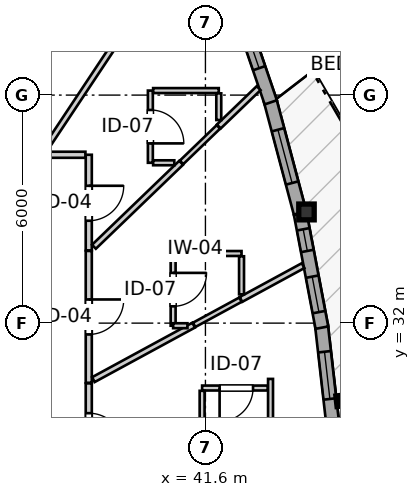
"""IFC4 building model, lengths in metres.
Left out: names, types, materials, properties, quantities, classifications, styles, units other than length and angle.
Written with IfcOpenShell. Run it as: python <this file> out.ifc"""

import sys

from ifc_helpers import new_model, si_unit, direction, frame, frame_2d, origin, origin_2d, place, context, subcontext, project, spatial, rectangle, i_section, extrude, source, transform, mapped, element, fill, save


model = new_model("IFC4")
c1 = context("Model", 3, precision=1e-05, world=origin(), true_north=direction((0.0, 1.0)))
c2 = subcontext(c1, "Body", "Model", "MODEL_VIEW")
j1 = project(units=[si_unit("LENGTHUNIT", "METRE"), si_unit("PLANEANGLEUNIT", "RADIAN")], contexts=[c1])
p1 = place(None, origin())
s1 = spatial("IfcSite", under=j1, at=p1, CompositionType="ELEMENT")
p2 = place(p1, origin())
s2 = spatial("IfcBuilding", under=s1, at=p2, CompositionType="ELEMENT")
p3 = place(p2, frame((0.0, 0.0, 112.0)))
s3 = spatial("IfcBuildingStorey", under=s2, at=p3, CompositionType="ELEMENT", Elevation=112.0)
m1 = source(origin(), c2, "Body", "SweptSolid", [
    extrude(i_section(OverallWidth=0.406, OverallDepth=0.416, WebThickness=0.027, FlangeThickness=0.044, FilletRadius=0.015, at=origin_2d()), origin(), (0.0, 0.0, 1.0), 2.935),
])
p4 = place(p3, frame((44.259, 34.925, 0.0), z_axis=(0.0, 0.0, 1.0), x_axis=(1.0, 0.0, 0.0)))
e1 = element("IfcColumn", 1, at=p4, inside=s3, PredefinedType="PILASTER", context=c2, shape_type="MappedRepresentation", body=[
    mapped(m1, transform((0.0, 0.0, 0.0), x_axis=(1.0, 0.0, 0.0), y_axis=(0.0, 1.0, 0.0), z_axis=(0.0, 0.0, 1.0), scale=1.0)),
])
p5 = place(p3, frame((44.968, 29.184, 0.0), z_axis=(0.0, 0.0, 1.0), x_axis=(-0.113251751131, 0.993566324342, 0.0)))
e2 = element("IfcWall", 2, at=p5, inside=s3, PredefinedType="SOLIDWALL", context=c2, shape_type="SweptSolid", body=[
    extrude(rectangle(XDim=2.802, YDim=0.34, at=frame_2d((1.401, 0.0))), origin(), (0.0, 0.0, 1.0), 2.465),
])
p6 = place(p5, frame((0.826, 0.0, 0.82)))
e3 = element("IfcOpeningElement", 3, at=p6, cuts=e2, PredefinedType="OPENING", context=c2, shape_type="SweptSolid", body=[
    extrude(rectangle(XDim=1.25, YDim=1.35, at=frame_2d((0.625, 0.675))), frame((0.0, 0.18, 0.0), z_axis=(0.0, -1.0, 0.0), x_axis=(1.0, 0.0, 0.0)), (0.0, 0.0, 1.0), 0.36),
])
p7 = place(p3, frame((44.664, 31.881, 0.0), z_axis=(0.0, 0.0, 1.0), x_axis=(-0.18665909876, 0.982424745642, 0.0)))
e4 = element("IfcWall", 4, at=p7, inside=s3, PredefinedType="SOLIDWALL", context=c2, shape_type="SweptSolid", body=[
    extrude(rectangle(XDim=3.046, YDim=0.34, at=frame_2d((1.523, 0.0))), origin(), (0.0, 0.0, 1.0), 2.465),
])
p8 = place(p7, frame((0.416, 0.0, 0.82)))
e5 = element("IfcOpeningElement", 5, at=p8, cuts=e4, PredefinedType="OPENING", context=c2, shape_type="SweptSolid", body=[
    extrude(rectangle(XDim=0.95, YDim=1.35, at=frame_2d((0.475, 0.675))), frame((0.0, 0.18, 0.0), z_axis=(0.0, -1.0, 0.0), x_axis=(1.0, 0.0, 0.0)), (0.0, 0.0, 1.0), 0.36),
])
p9 = place(p7, frame((2.054, 0.0, 0.82)))
e6 = element("IfcOpeningElement", 6, at=p9, cuts=e4, PredefinedType="OPENING", context=c2, shape_type="SweptSolid", body=[
    extrude(rectangle(XDim=0.58, YDim=1.35, at=frame_2d((0.29, 0.675))), frame((0.0, 0.18, 0.0), z_axis=(0.0, -1.0, 0.0), x_axis=(1.0, 0.0, 0.0)), (0.0, 0.0, 1.0), 0.36),
])
p10 = place(p3, frame((44.09, 34.901, 0.0), z_axis=(0.0, 0.0, 1.0), x_axis=(-0.257108087637, 0.966382652613, 0.0)))
e7 = element("IfcWall", 7, at=p10, inside=s3, PredefinedType="SOLIDWALL", context=c2, shape_type="SweptSolid", body=[
    extrude(rectangle(XDim=3.096, YDim=0.34, at=frame_2d((1.548, 0.0))), origin(), (0.0, 0.0, 1.0), 2.465),
])
p11 = place(p10, frame((0.813, 0.0, 0.82)))
e8 = element("IfcOpeningElement", 8, at=p11, cuts=e7, PredefinedType="OPENING", context=c2, shape_type="SweptSolid", body=[
    extrude(rectangle(XDim=1.45, YDim=1.25, at=frame_2d((0.725, 0.625))), frame((0.0, 0.18, 0.0), z_axis=(0.0, -1.0, 0.0), x_axis=(1.0, 0.0, 0.0)), (0.0, 0.0, 1.0), 0.36),
])
p12 = place(p3, frame((43.319, 37.809, 0.0), z_axis=(0.0, 0.0, 1.0), x_axis=(-0.323586371726, 0.946198636669, 0.0)))
e9 = element("IfcWall", 9, at=p12, inside=s3, PredefinedType="SOLIDWALL", context=c2, shape_type="SweptSolid", body=[
    extrude(rectangle(XDim=2.952, YDim=0.34, at=frame_2d((1.476, 0.0))), origin(), (0.0, 0.0, 1.0), 2.465),
])
p13 = place(p12, frame((0.949, 0.0, 0.82)))
e10 = element("IfcOpeningElement", 10, at=p13, cuts=e9, PredefinedType="OPENING", context=c2, shape_type="SweptSolid", body=[
    extrude(rectangle(XDim=1.45, YDim=1.25, at=frame_2d((0.725, 0.625))), frame((0.0, 0.18, 0.0), z_axis=(0.0, -1.0, 0.0), x_axis=(1.0, 0.0, 0.0)), (0.0, 0.0, 1.0), 0.36),
])
p14 = place(p3, frame((38.53, 33.899, 0.0), z_axis=(0.0, 0.0, 1.0), x_axis=(0.0, -1.0, 0.0)))
e11 = element("IfcWall", 11, at=p14, inside=s3, PredefinedType="PARTITIONING", context=c2, shape_type="SweptSolid", body=[
    extrude(rectangle(XDim=3.469, YDim=0.16, at=frame_2d((1.734, 0.0))), origin(), (0.0, 0.0, 1.0), 2.935),
])
p15 = place(p14, frame((1.277, 0.0, 0.0)))
e12 = element("IfcOpeningElement", 12, at=p15, cuts=e11, PredefinedType="OPENING", context=c2, shape_type="SweptSolid", body=[
    extrude(rectangle(XDim=0.92, YDim=2.1, at=frame_2d((0.46, 1.05))), frame((0.0, 0.09, 0.0), z_axis=(0.0, -1.0, 0.0), x_axis=(1.0, 0.0, 0.0)), (0.0, 0.0, 1.0), 0.18),
])
p16 = place(p3, frame((38.53, 30.415, 0.0), z_axis=(0.0, 0.0, 1.0), x_axis=(0.0, -1.0, 0.0)))
e13 = element("IfcWall", 13, at=p16, inside=s3, PredefinedType="PARTITIONING", context=c2, shape_type="SweptSolid", body=[
    extrude(rectangle(XDim=2.536, YDim=0.16, at=frame_2d((1.268, 0.0))), origin(), (0.0, 0.0, 1.0), 2.935),
])
p17 = place(p16, frame((0.784, 0.0, 0.0)))
e14 = element("IfcOpeningElement", 14, at=p17, cuts=e13, PredefinedType="OPENING", context=c2, shape_type="SweptSolid", body=[
    extrude(rectangle(XDim=0.92, YDim=2.1, at=frame_2d((0.46, 1.05))), frame((0.0, 0.09, 0.0), z_axis=(0.0, -1.0, 0.0), x_axis=(1.0, 0.0, 0.0)), (0.0, 0.0, 1.0), 0.18),
])
p18 = place(p3, frame((38.53, 36.43, 0.0), z_axis=(0.0, 0.0, 1.0), x_axis=(0.0, -1.0, 0.0)))
e15 = element("IfcWall", 15, at=p18, inside=s3, PredefinedType="PARTITIONING", context=c2, shape_type="SweptSolid", body=[
    extrude(rectangle(XDim=2.516, YDim=0.16, at=frame_2d((1.258, 0.0))), origin(), (0.0, 0.0, 1.0), 2.573),
])
p19 = place(p18, frame((0.816, 0.0, 0.0)))
e16 = element("IfcOpeningElement", 16, at=p19, cuts=e15, PredefinedType="OPENING", context=c2, shape_type="SweptSolid", body=[
    extrude(rectangle(XDim=0.92, YDim=2.1, at=frame_2d((0.46, 1.05))), frame((0.0, 0.09, 0.0), z_axis=(0.0, -1.0, 0.0), x_axis=(1.0, 0.0, 0.0)), (0.0, 0.0, 1.0), 0.18),
])
p20 = place(p3, frame((40.75, 33.832, 0.0), z_axis=(0.0, 0.0, 1.0), x_axis=(0.0, -1.0, 0.0)))
e17 = element("IfcWall", 17, at=p20, inside=s3, PredefinedType="PARTITIONING", context=c2, shape_type="SweptSolid", body=[
    extrude(rectangle(XDim=1.9, YDim=0.13, at=frame_2d((0.95, 0.0))), origin(), (0.0, 0.0, 1.0), 2.935),
])
p21 = place(p20, frame((0.51, 0.0, 0.0)))
e18 = element("IfcOpeningElement", 18, at=p21, cuts=e17, PredefinedType="OPENING", context=c2, shape_type="SweptSolid", body=[
    extrude(rectangle(XDim=0.88, YDim=2.05, at=frame_2d((0.44, 1.025))), frame((0.0, 0.075, 0.0), z_axis=(0.0, -1.0, 0.0), x_axis=(1.0, 0.0, 0.0)), (0.0, 0.0, 1.0), 0.15),
])
p22 = place(p3, frame((40.151, 38.119, 0.0), z_axis=(0.0, 0.0, 1.0), x_axis=(0.0, -1.0, 0.0)))
e19 = element("IfcWall", 19, at=p22, inside=s3, PredefinedType="PARTITIONING", context=c2, shape_type="SweptSolid", body=[
    extrude(rectangle(XDim=1.9, YDim=0.13, at=frame_2d((0.95, 0.0))), origin(), (0.0, 0.0, 1.0), 2.935),
])
p23 = place(p22, frame((0.51, 0.0, 0.0)))
e20 = element("IfcOpeningElement", 20, at=p23, cuts=e19, PredefinedType="OPENING", context=c2, shape_type="SweptSolid", body=[
    extrude(rectangle(XDim=0.88, YDim=2.05, at=frame_2d((0.44, 1.025))), frame((0.0, 0.075, 0.0), z_axis=(0.0, -1.0, 0.0), x_axis=(1.0, 0.0, 0.0)), (0.0, 0.0, 1.0), 0.15),
])
p24 = place(p3, frame((43.24, 30.292, 0.0), z_axis=(0.0, 0.0, 1.0), x_axis=(-1.0, 0.0, 0.0)))
e21 = element("IfcWall", 21, at=p24, inside=s3, PredefinedType="PARTITIONING", context=c2, shape_type="SweptSolid", body=[
    extrude(rectangle(XDim=1.727, YDim=0.13, at=frame_2d((0.864, 0.0))), origin(), (0.0, 0.0, 1.0), 2.935),
])
p25 = place(p24, frame((0.387, 0.0, 0.0)))
e22 = element("IfcOpeningElement", 22, at=p25, cuts=e21, PredefinedType="OPENING", context=c2, shape_type="SweptSolid", body=[
    extrude(rectangle(XDim=0.88, YDim=2.05, at=frame_2d((0.44, 1.025))), frame((0.0, 0.075, 0.0), z_axis=(0.0, -1.0, 0.0), x_axis=(1.0, 0.0, 0.0)), (0.0, 0.0, 1.0), 0.15),
])
p26 = place(p3, frame((35.191, 36.548, 0.0), z_axis=(0.0, 0.0, 1.0), x_axis=(0.417154036681, 0.908835799075, 0.0)))
e23 = element("IfcWall", 23, at=p26, inside=s3, PredefinedType="PARTITIONING", context=c2, shape_type="SweptSolid", body=[
    extrude(rectangle(XDim=9.949, YDim=0.145, at=frame_2d((4.974, 0.0))), origin(), (0.0, 0.0, 1.0), 2.935),
])
p27 = place(p3, frame((37.366, 36.557, 0.0), z_axis=(0.0, 0.0, 1.0), x_axis=(0.553463679146, 0.832873313215, 0.0)))
e24 = element("IfcWall", 24, at=p27, inside=s3, PredefinedType="PARTITIONING", context=c2, shape_type="SweptSolid", body=[
    extrude(rectangle(XDim=7.704, YDim=0.145, at=frame_2d((3.852, 0.0))), origin(), (0.0, 0.0, 1.0), 2.935),
])
p28 = place(p3, frame((38.666, 34.009, 0.0), z_axis=(0.0, 0.0, 1.0), x_axis=(0.72031454127, 0.693647577402, 0.0)))
e25 = element("IfcWall", 25, at=p28, inside=s3, PredefinedType="PARTITIONING", context=c2, shape_type="SweptSolid", body=[
    extrude(rectangle(XDim=3.186, YDim=0.145, at=frame_2d((1.593, 0.0))), origin(), (0.0, 0.0, 1.0), 2.935),
])
p29 = place(p3, frame((38.652, 30.513, 0.0), z_axis=(0.0, 0.0, 1.0), x_axis=(0.878637115469, 0.47749012484, 0.0)))
e26 = element("IfcWall", 26, at=p29, inside=s3, PredefinedType="PARTITIONING", context=c2, shape_type="SweptSolid", body=[
    extrude(rectangle(XDim=3.003, YDim=0.145, at=frame_2d((1.501, 0.0))), origin(), (0.0, 0.0, 1.0), 2.935),
])
p30 = place(p3, frame((42.535, 32.624, 0.0), z_axis=(0.0, 0.0, 1.0), x_axis=(0.878631690287, 0.477500107669, 0.0)))
e27 = element("IfcWall", 27, at=p30, inside=s3, PredefinedType="PARTITIONING", context=c2, shape_type="SweptSolid", body=[
    extrude(rectangle(XDim=1.861, YDim=0.145, at=frame_2d((0.93, 0.0))), origin(), (0.0, 0.0, 1.0), 2.935),
])
p31 = place(p3, frame((40.224, 38.119, 0.0), z_axis=(0.0, 0.0, 1.0), x_axis=(1.0, 0.0, 0.0)))
e28 = element("IfcWall", 28, at=p31, inside=s3, PredefinedType="PARTITIONING", context=c2, shape_type="SweptSolid", body=[
    extrude(rectangle(XDim=1.727, YDim=0.13, at=frame_2d((0.863, 0.0))), origin(), (0.0, 0.0, 1.0), 2.935),
])
p32 = place(p3, frame((40.823, 33.832, 0.0), z_axis=(0.0, 0.0, 1.0), x_axis=(1.0, 0.0, 0.0)))
e29 = element("IfcWall", 29, at=p32, inside=s3, PredefinedType="PARTITIONING", context=c2, shape_type="SweptSolid", body=[
    extrude(rectangle(XDim=1.727, YDim=0.13, at=frame_2d((0.864, 0.0))), origin(), (0.0, 0.0, 1.0), 2.935),
])
p33 = place(p3, frame((41.513, 28.683, 0.0), z_axis=(0.0, 0.0, 1.0), x_axis=(0.0, 1.0, 0.0)))
e30 = element("IfcWall", 30, at=p33, inside=s3, PredefinedType="PARTITIONING", context=c2, shape_type="SweptSolid", body=[
    extrude(rectangle(XDim=1.536, YDim=0.13, at=frame_2d((0.768, 0.0))), origin(), (0.0, 0.0, 1.0), 2.935),
])
p34 = place(p3, frame((41.951, 37.173, 0.0), z_axis=(0.0, 0.0, 1.0), x_axis=(0.720559112487, 0.693393514111, 0.0)))
e31 = element("IfcWall", 31, at=p34, inside=s3, PredefinedType="PARTITIONING", context=c2, shape_type="SweptSolid", body=[
    extrude(rectangle(XDim=1.456, YDim=0.145, at=frame_2d((0.728, 0.0))), origin(), (0.0, 0.0, 1.0), 2.935),
])
p35 = place(p3, frame((41.303, 31.954, 0.0), z_axis=(0.0, 0.0, 1.0), x_axis=(0.87855387187, 0.477643270885, 0.0)))
e32 = element("IfcWall", 32, at=p35, inside=s3, PredefinedType="PARTITIONING", context=c2, shape_type="SweptSolid", body=[
    extrude(rectangle(XDim=1.387, YDim=0.13, at=frame_2d((0.694, 0.0))), origin(), (0.0, 0.0, 1.0), 2.935),
])
p36 = place(p3, frame((40.972, 36.229, 0.0), z_axis=(0.0, 0.0, 1.0), x_axis=(0.72014550452, 0.693823069896, 0.0)))
e33 = element("IfcWall", 33, at=p36, inside=s3, PredefinedType="PARTITIONING", context=c2, shape_type="SweptSolid", body=[
    extrude(rectangle(XDim=1.345, YDim=0.13, at=frame_2d((0.672, 0.0))), origin(), (0.0, 0.0, 1.0), 2.935),
])
p37 = place(p3, frame((43.313, 28.762, 0.0), z_axis=(0.0, 0.0, 1.0), x_axis=(0.0, 1.0, 0.0)))
e34 = element("IfcWall", 34, at=p37, inside=s3, PredefinedType="PARTITIONING", context=c2, shape_type="SweptSolid", body=[
    extrude(rectangle(XDim=1.77, YDim=0.13, at=frame_2d((0.885, 0.0))), origin(), (0.0, 0.0, 1.0), 2.935),
])
p38 = place(p3, frame((37.463, 36.43, 0.0), z_axis=(0.0, 0.0, 1.0), x_axis=(1.0, 0.0, 0.0)))
e35 = element("IfcWall", 35, at=p38, inside=s3, PredefinedType="PARTITIONING", context=c2, shape_type="SweptSolid", body=[
    extrude(rectangle(XDim=0.979, YDim=0.16, at=frame_2d((0.489, 0.0))), origin(), (0.0, 0.0, 1.0), 2.573),
])
p39 = place(p3, frame((42.55, 32.758, 0.0), z_axis=(0.0, 0.0, 1.0), x_axis=(0.0, 1.0, 0.0)))
e36 = element("IfcWall", 36, at=p39, inside=s3, PredefinedType="PARTITIONING", context=c2, shape_type="SweptSolid", body=[
    extrude(rectangle(XDim=1.001, YDim=0.13, at=frame_2d((0.5, 0.0))), origin(), (0.0, 0.0, 1.0), 2.935),
])
p40 = place(p3, frame((41.951, 37.344, 0.0), z_axis=(0.0, 0.0, 1.0), x_axis=(0.0, 1.0, 0.0)))
e37 = element("IfcWall", 37, at=p40, inside=s3, PredefinedType="PARTITIONING", context=c2, shape_type="SweptSolid", body=[
    extrude(rectangle(XDim=0.702, YDim=0.13, at=frame_2d((0.351, 0.0))), origin(), (0.0, 0.0, 1.0), 2.935),
])
p41 = place(p3, frame((40.224, 36.219, 0.0), z_axis=(0.0, 0.0, 1.0), x_axis=(1.0, 0.0, 0.0)))
e38 = element("IfcWall", 38, at=p41, inside=s3, PredefinedType="PARTITIONING", context=c2, shape_type="SweptSolid", body=[
    extrude(rectangle(XDim=0.557, YDim=0.13, at=frame_2d((0.278, 0.0))), origin(), (0.0, 0.0, 1.0), 2.935),
])
p42 = place(p3, frame((40.75, 31.932, 0.0), z_axis=(0.0, 0.0, 1.0), x_axis=(1.0, 0.0, 0.0)))
e39 = element("IfcWall", 39, at=p42, inside=s3, PredefinedType="PARTITIONING", context=c2, shape_type="SweptSolid", body=[
    extrude(rectangle(XDim=0.377, YDim=0.13, at=frame_2d((0.188, 0.0))), origin(), (0.0, 0.0, 1.0), 2.935),
])
m2 = source(origin(), c2, "Body", "SweptSolid", [
    extrude(rectangle(XDim=1.25, YDim=1.35, at=frame_2d((0.625, 0.675))), frame((0.0, 0.03, 0.0), z_axis=(0.0, -1.0, 0.0), x_axis=(1.0, 0.0, 0.0)), (0.0, 0.0, 1.0), 0.06),
])
p43 = place(p6, origin())
e40 = element("IfcWindow", 40, at=p43, inside=s3, PartitioningType="SINGLE_PANEL", PredefinedType="WINDOW", context=c2, shape_type="MappedRepresentation", body=[
    mapped(m2, transform((0.0, 0.0, 0.0), x_axis=(1.0, 0.0, 0.0), y_axis=(0.0, 1.0, 0.0), z_axis=(0.0, 0.0, 1.0), scale=1.0)),
])
fill(e3, e40)
m3 = source(origin(), c2, "Body", "SweptSolid", [
    extrude(rectangle(XDim=0.95, YDim=1.35, at=frame_2d((0.475, 0.675))), frame((0.0, 0.03, 0.0), z_axis=(0.0, -1.0, 0.0), x_axis=(1.0, 0.0, 0.0)), (0.0, 0.0, 1.0), 0.06),
])
p44 = place(p8, origin())
e41 = element("IfcWindow", 41, at=p44, inside=s3, PartitioningType="SINGLE_PANEL", PredefinedType="WINDOW", context=c2, shape_type="MappedRepresentation", body=[
    mapped(m3, transform((0.0, 0.0, 0.0), x_axis=(1.0, 0.0, 0.0), y_axis=(0.0, 1.0, 0.0), z_axis=(0.0, 0.0, 1.0), scale=1.0)),
])
fill(e5, e41)
m4 = source(origin(), c2, "Body", "SweptSolid", [
    extrude(rectangle(XDim=0.58, YDim=1.35, at=frame_2d((0.29, 0.675))), frame((0.0, 0.03, 0.0), z_axis=(0.0, -1.0, 0.0), x_axis=(1.0, 0.0, 0.0)), (0.0, 0.0, 1.0), 0.06),
])
p45 = place(p9, origin())
e42 = element("IfcWindow", 42, at=p45, inside=s3, PartitioningType="SINGLE_PANEL", PredefinedType="WINDOW", context=c2, shape_type="MappedRepresentation", body=[
    mapped(m4, transform((0.0, 0.0, 0.0), x_axis=(1.0, 0.0, 0.0), y_axis=(0.0, 1.0, 0.0), z_axis=(0.0, 0.0, 1.0), scale=1.0)),
])
fill(e6, e42)
m5 = source(origin(), c2, "Body", "SweptSolid", [
    extrude(rectangle(XDim=1.45, YDim=1.25, at=frame_2d((0.725, 0.625))), frame((0.0, 0.03, 0.0), z_axis=(0.0, -1.0, 0.0), x_axis=(1.0, 0.0, 0.0)), (0.0, 0.0, 1.0), 0.06),
])
p46 = place(p11, origin())
e43 = element("IfcWindow", 43, at=p46, inside=s3, PartitioningType="SINGLE_PANEL", PredefinedType="WINDOW", context=c2, shape_type="MappedRepresentation", body=[
    mapped(m5, transform((0.0, 0.0, 0.0), x_axis=(1.0, 0.0, 0.0), y_axis=(0.0, 1.0, 0.0), z_axis=(0.0, 0.0, 1.0), scale=1.0)),
])
fill(e8, e43)
p47 = place(p13, origin())
e44 = element("IfcWindow", 44, at=p47, inside=s3, PartitioningType="SINGLE_PANEL", PredefinedType="WINDOW", context=c2, shape_type="MappedRepresentation", body=[
    mapped(m5, transform((0.0, 0.0, 0.0), x_axis=(1.0, 0.0, 0.0), y_axis=(0.0, 1.0, 0.0), z_axis=(0.0, 0.0, 1.0), scale=1.0)),
])
fill(e10, e44)
m6 = source(origin(), c2, "Body", "SweptSolid", [
    extrude(rectangle(XDim=0.92, YDim=2.1, at=frame_2d((0.46, 1.05))), frame((0.0, 0.025, 0.0), z_axis=(0.0, -1.0, 0.0), x_axis=(1.0, 0.0, 0.0)), (0.0, 0.0, 1.0), 0.05),
])
p48 = place(p15, origin())
e45 = element("IfcDoor", 45, at=p48, inside=s3, OperationType="SINGLE_SWING_LEFT", PredefinedType="DOOR", context=c2, shape_type="MappedRepresentation", body=[
    mapped(m6, transform((0.0, 0.0, 0.0), x_axis=(1.0, 0.0, 0.0), y_axis=(0.0, 1.0, 0.0), z_axis=(0.0, 0.0, 1.0), scale=1.0)),
])
fill(e12, e45)
p49 = place(p17, origin())
e46 = element("IfcDoor", 46, at=p49, inside=s3, OperationType="SINGLE_SWING_RIGHT", PredefinedType="DOOR", context=c2, shape_type="MappedRepresentation", body=[
    mapped(m6, transform((0.0, 0.0, 0.0), x_axis=(1.0, 0.0, 0.0), y_axis=(0.0, 1.0, 0.0), z_axis=(0.0, 0.0, 1.0), scale=1.0)),
])
fill(e14, e46)
p50 = place(p19, origin())
e47 = element("IfcDoor", 47, at=p50, inside=s3, OperationType="SINGLE_SWING_LEFT", PredefinedType="DOOR", context=c2, shape_type="MappedRepresentation", body=[
    mapped(m6, transform((0.0, 0.0, 0.0), x_axis=(1.0, 0.0, 0.0), y_axis=(0.0, 1.0, 0.0), z_axis=(0.0, 0.0, 1.0), scale=1.0)),
])
fill(e16, e47)
m7 = source(origin(), c2, "Body", "SweptSolid", [
    extrude(rectangle(XDim=0.88, YDim=2.05, at=frame_2d((0.44, 1.025))), frame((0.0, 0.025, 0.0), z_axis=(0.0, -1.0, 0.0), x_axis=(1.0, 0.0, 0.0)), (0.0, 0.0, 1.0), 0.05),
])
p51 = place(p21, origin())
e48 = element("IfcDoor", 48, at=p51, inside=s3, OperationType="SINGLE_SWING_LEFT", PredefinedType="DOOR", context=c2, shape_type="MappedRepresentation", body=[
    mapped(m7, transform((0.0, 0.0, 0.0), x_axis=(1.0, 0.0, 0.0), y_axis=(0.0, 1.0, 0.0), z_axis=(0.0, 0.0, 1.0), scale=1.0)),
])
fill(e18, e48)
p52 = place(p23, origin())
e49 = element("IfcDoor", 49, at=p52, inside=s3, OperationType="SINGLE_SWING_RIGHT", PredefinedType="DOOR", context=c2, shape_type="MappedRepresentation", body=[
    mapped(m7, transform((0.0, 0.0, 0.0), x_axis=(1.0, 0.0, 0.0), y_axis=(0.0, 1.0, 0.0), z_axis=(0.0, 0.0, 1.0), scale=1.0)),
])
fill(e20, e49)
p53 = place(p25, origin())
e50 = element("IfcDoor", 50, at=p53, inside=s3, OperationType="SINGLE_SWING_RIGHT", PredefinedType="DOOR", context=c2, shape_type="MappedRepresentation", body=[
    mapped(m7, transform((0.0, 0.0, 0.0), x_axis=(1.0, 0.0, 0.0), y_axis=(0.0, 1.0, 0.0), z_axis=(0.0, 0.0, 1.0), scale=1.0)),
])
fill(e22, e50)
save(model, sys.argv[1])
